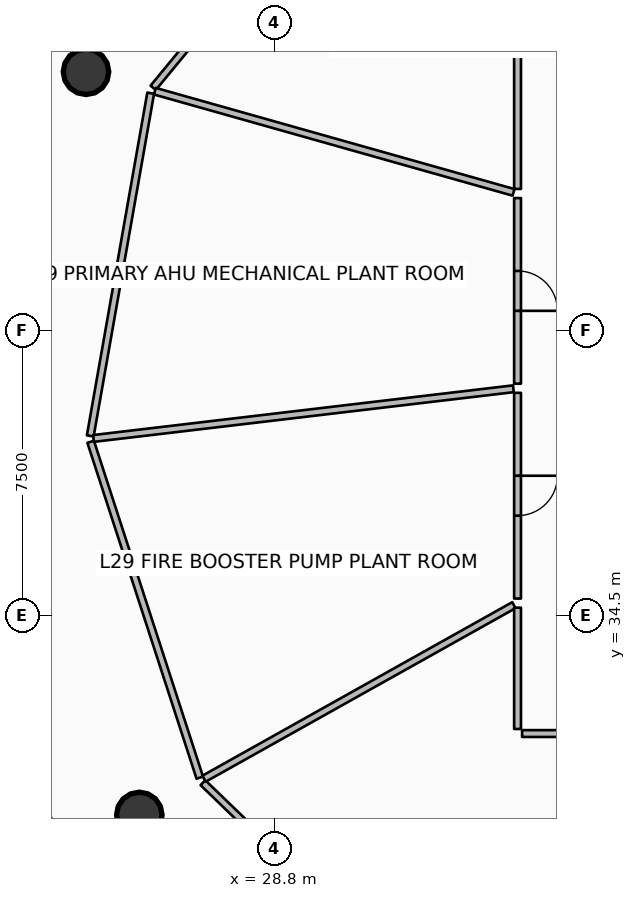
"""IFC4 building model, lengths in metres.
Left out: names, types, materials, properties, quantities, classifications, styles, units other than length and angle.
Written with IfcOpenShell. Run it as: python <this file> out.ifc"""

import sys

from ifc_helpers import new_model, si_unit, direction, frame, frame_2d, origin, origin_2d, place, context, subcontext, project, spatial, rectangle, circle, extrude, element, fill, save


model = new_model("IFC4")
c1 = context("Model", 3, precision=1e-05, world=origin(), true_north=direction((0.0, 1.0)))
c2 = subcontext(c1, "Body", "Model", "MODEL_VIEW")
j1 = project(units=[si_unit("LENGTHUNIT", "METRE"), si_unit("PLANEANGLEUNIT", "RADIAN")], contexts=[c1])
p1 = place(None, origin())
s1 = spatial("IfcSite", under=j1, at=p1, CompositionType="ELEMENT")
p2 = place(p1, origin())
s2 = spatial("IfcBuilding", under=s1, at=p2, CompositionType="ELEMENT")
p3 = place(p2, frame((0.0, 0.0, 116.4)))
s3 = spatial("IfcBuildingStorey", under=s2, at=p3, CompositionType="ELEMENT", Elevation=116.4)
for number, where, z_axis, x_axis in (
    (1, (23.844, 48.812, 0.0), (0.0, 0.0, 1.0), (1.0, 0.0, 0.0)),
    (2, (25.247, 29.258, 0.0), (0.0, 0.0, 1.0), (1.0, 0.0, 0.0)),
):
    element("IfcColumn", number, at=place(p3, frame(where, z_axis=z_axis, x_axis=x_axis)), inside=s3, PredefinedType="COLUMN", context=c2, shape_type="SweptSolid", body=[
        extrude(circle(Radius=0.6, at=origin_2d()), origin(), (0.0, 0.0, 1.0), 6.28),
    ])
p4 = place(p3, frame((31.186, 55.154, 0.0), z_axis=(0.0, 0.0, 1.0), x_axis=(-0.636015746841, -0.771676078267, 0.0)))
e3 = element("IfcWall", 3, at=p4, inside=s3, PredefinedType="PARTITIONING", context=c2, shape_type="SweptSolid", body=[
    extrude(rectangle(XDim=8.764, YDim=0.18, at=frame_2d((4.382, 0.0))), origin(), (0.0, 0.0, 1.0), 2.304),
])
p5 = place(p3, frame((25.547, 48.25, 0.0), z_axis=(0.0, 0.0, 1.0), x_axis=(-0.173665182346, -0.984804754477, 0.0)))
e4 = element("IfcWall", 4, at=p5, inside=s3, PredefinedType="PARTITIONING", context=c2, shape_type="SweptSolid", body=[
    extrude(rectangle(XDim=9.157, YDim=0.18, at=frame_2d((4.579, 0.0))), origin(), (0.0, 0.0, 1.0), 2.304),
])
p6 = place(p3, frame((23.967, 39.076, 0.0), z_axis=(0.0, 0.0, 1.0), x_axis=(0.309006462603, -0.951059938211, 0.0)))
e5 = element("IfcWall", 5, at=p6, inside=s3, PredefinedType="PARTITIONING", context=c2, shape_type="SweptSolid", body=[
    extrude(rectangle(XDim=9.292, YDim=0.18, at=frame_2d((4.646, 0.0))), origin(), (0.0, 0.0, 1.0), 5.273),
])
p7 = place(p3, frame((26.921, 30.107, 0.0), z_axis=(0.0, 0.0, 1.0), x_axis=(0.719342658177, -0.694655411069, 0.0)))
e6 = element("IfcWall", 6, at=p7, inside=s3, PredefinedType="PARTITIONING", context=c2, shape_type="SweptSolid", body=[
    extrude(rectangle(XDim=9.157, YDim=0.18, at=frame_2d((4.579, 0.0))), origin(), (0.0, 0.0, 1.0), 2.304),
])
p8 = place(p3, frame((35.2, 51.971, 0.0), z_axis=(0.0, 0.0, 1.0), x_axis=(0.0, -1.0, 0.0)))
e7 = element("IfcWall", 7, at=p8, inside=s3, PredefinedType="PARTITIONING", context=c2, shape_type="SweptSolid", body=[
    extrude(rectangle(XDim=6.241, YDim=0.18, at=frame_2d((3.12, 0.0))), origin(), (0.0, 0.0, 1.0), 2.304),
])
p9 = place(p3, frame((35.094, 45.64, 0.0), z_axis=(0.0, 0.0, 1.0), x_axis=(-0.962454179432, 0.271444197754, 0.0)))
e8 = element("IfcWall", 8, at=p9, inside=s3, PredefinedType="PARTITIONING", context=c2, shape_type="SweptSolid", body=[
    extrude(rectangle(XDim=9.805, YDim=0.18, at=frame_2d((4.903, 0.0))), origin(), (0.0, 0.0, 1.0), 2.304),
])
p10 = place(p3, frame((35.2, 45.49, 0.0), z_axis=(0.0, 0.0, 1.0), x_axis=(0.0, -1.0, 0.0)))
e9 = element("IfcWall", 9, at=p10, inside=s3, PredefinedType="PARTITIONING", context=c2, shape_type="SweptSolid", body=[
    extrude(rectangle(XDim=4.885, YDim=0.18, at=frame_2d((2.442, 0.0))), origin(), (0.0, 0.0, 1.0), 2.304),
])
p11 = place(p10, frame((1.917, 0.0, 0.0)))
e10 = element("IfcOpeningElement", 10, at=p11, cuts=e9, PredefinedType="OPENING", context=c2, shape_type="SweptSolid", body=[
    extrude(rectangle(XDim=1.05, YDim=2.1, at=frame_2d((0.525, 1.05))), frame((0.0, 0.1, 0.0), z_axis=(0.0, -1.0, 0.0), x_axis=(1.0, 0.0, 0.0)), (0.0, 0.0, 1.0), 0.2),
])
p12 = place(p3, frame((35.091, 40.472, 0.0), z_axis=(0.0, 0.0, 1.0), x_axis=(-0.993067224792, -0.117547807482, 0.0)))
e11 = element("IfcWall", 11, at=p12, inside=s3, PredefinedType="PARTITIONING", context=c2, shape_type="SweptSolid", body=[
    extrude(rectangle(XDim=11.126, YDim=0.18, at=frame_2d((5.563, 0.0))), origin(), (0.0, 0.0, 1.0), 5.273),
])
p13 = place(p3, frame((35.2, 40.365, 0.0), z_axis=(0.0, 0.0, 1.0), x_axis=(0.0, -1.0, 0.0)))
e12 = element("IfcWall", 12, at=p13, inside=s3, PredefinedType="PARTITIONING", context=c2, shape_type="SweptSolid", body=[
    extrude(rectangle(XDim=5.413, YDim=0.18, at=frame_2d((2.707, 0.0))), origin(), (0.0, 0.0, 1.0), 5.273),
])
p14 = place(p13, frame((2.182, 0.0, 0.0)))
e13 = element("IfcOpeningElement", 13, at=p14, cuts=e12, PredefinedType="OPENING", context=c2, shape_type="SweptSolid", body=[
    extrude(rectangle(XDim=1.05, YDim=2.1, at=frame_2d((0.525, 1.05))), frame((0.0, 0.1, 0.0), z_axis=(0.0, -1.0, 0.0), x_axis=(1.0, 0.0, 0.0)), (0.0, 0.0, 1.0), 0.2),
])
p15 = place(p3, frame((35.104, 34.778, 0.0), z_axis=(0.0, 0.0, 1.0), x_axis=(-0.872492204965, -0.488628030586, 0.0)))
e14 = element("IfcWall", 14, at=p15, inside=s3, PredefinedType="PARTITIONING", context=c2, shape_type="SweptSolid", body=[
    extrude(rectangle(XDim=9.345, YDim=0.18, at=frame_2d((4.672, 0.0))), origin(), (0.0, 0.0, 1.0), 5.273),
])
p16 = place(p3, frame((35.2, 34.712, 0.0), z_axis=(0.0, 0.0, 1.0), x_axis=(0.0, -1.0, 0.0)))
e15 = element("IfcWall", 15, at=p16, inside=s3, PredefinedType="PARTITIONING", context=c2, shape_type="SweptSolid", body=[
    extrude(rectangle(XDim=3.192, YDim=0.18, at=frame_2d((1.596, 0.0))), origin(), (0.0, 0.0, 1.0), 5.273),
])
p17 = place(p3, frame((35.32, 31.4, 0.0), z_axis=(0.0, 0.0, 1.0), x_axis=(1.0, 0.0, 0.0)))
e16 = element("IfcWall", 16, at=p17, inside=s3, PredefinedType="PARTITIONING", context=c2, shape_type="SweptSolid", body=[
    extrude(rectangle(XDim=4.204, YDim=0.18, at=frame_2d((2.102, 0.0))), origin(), (0.0, 0.0, 1.0), 2.304),
])
p18 = place(p11, origin())
e17 = element("IfcDoor", 17, at=p18, inside=s3, OperationType="SINGLE_SWING_RIGHT", PredefinedType="DOOR", context=c2, shape_type="SweptSolid", body=[
    extrude(rectangle(XDim=1.05, YDim=2.1, at=frame_2d((0.525, 1.05))), frame((0.0, 0.025, 0.0), z_axis=(0.0, -1.0, 0.0), x_axis=(1.0, 0.0, 0.0)), (0.0, 0.0, 1.0), 0.05),
])
fill(e10, e17)
p19 = place(p14, origin())
e18 = element("IfcDoor", 18, at=p19, inside=s3, OperationType="SINGLE_SWING_LEFT", PredefinedType="DOOR", context=c2, shape_type="SweptSolid", body=[
    extrude(rectangle(XDim=1.05, YDim=2.1, at=frame_2d((0.525, 1.05))), frame((0.0, 0.025, 0.0), z_axis=(0.0, -1.0, 0.0), x_axis=(1.0, 0.0, 0.0)), (0.0, 0.0, 1.0), 0.05),
])
fill(e13, e18)
save(model, sys.argv[1])
